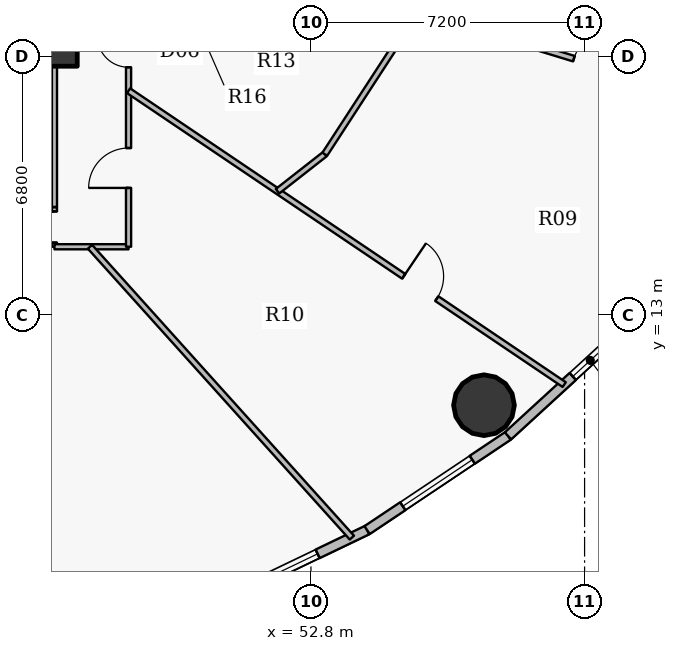
"""IFC4 building model, lengths in metres.
Left out: names, types, materials, properties, quantities, classifications, styles, units other than length and angle.
Written with IfcOpenShell. Run it as: python <this file> out.ifc"""

import sys

from ifc_helpers import new_model, si_unit, direction, frame, frame_2d, origin, origin_2d, place, context, subcontext, project, spatial, rectangle, hollow_circle, extrude, source, transform, mapped, element, fill, save


model = new_model("IFC4")
c1 = context("Model", 3, precision=1e-05, world=origin(), true_north=direction((0.0, 1.0)))
c2 = subcontext(c1, "Body", "Model", "MODEL_VIEW")
j1 = project(units=[si_unit("LENGTHUNIT", "METRE"), si_unit("PLANEANGLEUNIT", "RADIAN")], contexts=[c1])
p1 = place(None, origin())
s1 = spatial("IfcSite", under=j1, at=p1, CompositionType="ELEMENT")
p2 = place(p1, origin())
s2 = spatial("IfcBuilding", under=s1, at=p2, CompositionType="ELEMENT")
p3 = place(p2, frame((0.0, 0.0, 40.8)))
s3 = spatial("IfcBuildingStorey", under=s2, at=p3, CompositionType="ELEMENT", Elevation=40.8)
p4 = place(p3, frame((45.95, 20.25, 0.0), z_axis=(0.0, 0.0, 1.0), x_axis=(1.0, 0.0, 0.0)))
e1 = element("IfcColumn", 1, at=p4, inside=s3, PredefinedType="COLUMN", context=c2, shape_type="SweptSolid", body=[
    extrude(rectangle(XDim=1.4, YDim=1.4, at=origin_2d()), origin(), (0.0, 0.0, 1.0), 4.2),
])
p5 = place(p3, frame((57.353, 10.631, 0.0), z_axis=(0.0, 0.0, 1.0), x_axis=(1.0, 0.0, 0.0)))
e2 = element("IfcColumn", 2, at=p5, inside=s3, PredefinedType="COLUMN", context=c2, shape_type="SweptSolid", body=[
    extrude(hollow_circle(Radius=0.8, WallThickness=0.045, at=origin_2d()), origin(), (0.0, 0.0, 1.0), 4.2),
])
p6 = place(p3, frame((54.277, 7.344, 0.0), z_axis=(0.0, 0.0, 1.0), x_axis=(-0.901601503137, -0.432567601123, 0.0)))
e3 = element("IfcWall", 3, at=p6, inside=s3, PredefinedType="SOLIDWALL", context=c2, shape_type="SweptSolid", body=[
    extrude(rectangle(XDim=4.613, YDim=0.25, at=frame_2d((2.306, 0.0))), origin(), (0.0, 0.0, 1.0), 3.95),
])
p7 = place(p6, frame((1.445, 0.0, 0.9)))
e4 = element("IfcOpeningElement", 4, at=p7, cuts=e3, PredefinedType="OPENING", context=c2, shape_type="SweptSolid", body=[
    extrude(rectangle(XDim=2.2, YDim=2.0, at=origin_2d()), frame((1.1, 0.135, 1.0), z_axis=(0.0, -1.0, 0.0), x_axis=(1.0, 0.0, 0.0)), (0.0, 0.0, 1.0), 0.27),
])
p8 = place(p3, frame((57.985, 9.824, 0.0), z_axis=(0.0, 0.0, 1.0), x_axis=(-0.831240982525, -0.555912249343, 0.0)))
e5 = element("IfcWall", 5, at=p8, inside=s3, PredefinedType="SOLIDWALL", context=c2, shape_type="SweptSolid", body=[
    extrude(rectangle(XDim=4.46, YDim=0.25, at=frame_2d((2.23, 0.0))), origin(), (0.0, 0.0, 1.0), 3.95),
])
p9 = place(p8, frame((1.13, 0.0, 0.9)))
e6 = element("IfcOpeningElement", 6, at=p9, cuts=e5, PredefinedType="OPENING", context=c2, shape_type="SweptSolid", body=[
    extrude(rectangle(XDim=2.2, YDim=2.0, at=origin_2d()), frame((1.1, 0.135, 1.0), z_axis=(0.0, -1.0, 0.0), x_axis=(1.0, 0.0, 0.0)), (0.0, 0.0, 1.0), 0.27),
])
p10 = place(p3, frame((61.15, 12.725, 0.0), z_axis=(0.0, 0.0, 1.0), x_axis=(-0.737116376281, -0.67576582321, 0.0)))
e7 = element("IfcWall", 7, at=p10, inside=s3, PredefinedType="SOLIDWALL", context=c2, shape_type="SweptSolid", body=[
    extrude(rectangle(XDim=4.294, YDim=0.25, at=frame_2d((2.147, 0.0))), origin(), (0.0, 0.0, 1.0), 3.95),
])
p11 = place(p10, frame((0.731, 0.0, 0.9)))
e8 = element("IfcOpeningElement", 8, at=p11, cuts=e7, PredefinedType="OPENING", context=c2, shape_type="SweptSolid", body=[
    extrude(rectangle(XDim=1.25, YDim=1.65, at=origin_2d()), frame((0.625, 0.135, 0.825), z_axis=(0.0, -1.0, 0.0), x_axis=(1.0, 0.0, 0.0)), (0.0, 0.0, 1.0), 0.27),
])
p12 = place(p3, frame((46.05, 14.8, 0.0), z_axis=(0.0, 0.0, 1.0), x_axis=(0.0, 1.0, 0.0)))
e9 = element("IfcWall", 9, at=p12, inside=s3, PredefinedType="PARTITIONING", context=c2, shape_type="SweptSolid", body=[
    extrude(rectangle(XDim=1.038, YDim=0.135, at=frame_2d((0.519, 0.0))), origin(), (0.0, 0.0, 1.0), 3.95),
])
p13 = place(p12, frame((0.109, 0.0, 0.0)))
e10 = element("IfcOpeningElement", 10, at=p13, cuts=e9, PredefinedType="OPENING", context=c2, shape_type="SweptSolid", body=[
    extrude(rectangle(XDim=0.82, YDim=2.1, at=origin_2d()), frame((0.41, 0.078, 1.05), z_axis=(0.0, -1.0, 0.0), x_axis=(1.0, 0.0, 0.0)), (0.0, 0.0, 1.0), 0.155),
])
p14 = place(p3, frame((46.05, 14.8, 0.0), z_axis=(0.0, 0.0, 1.0), x_axis=(1.0, 0.0, 0.0)))
e11 = element("IfcWall", 11, at=p14, inside=s3, PredefinedType="PARTITIONING", context=c2, shape_type="SweptSolid", body=[
    extrude(rectangle(XDim=1.95, YDim=0.135, at=frame_2d((0.975, 0.0))), origin(), (0.0, 0.0, 1.0), 3.95),
])
p15 = place(p3, frame((46.985, 14.8, 0.0), z_axis=(0.0, 0.0, 1.0), x_axis=(0.669133664768, -0.743142071662, 0.0)))
e12 = element("IfcWall", 12, at=p15, inside=s3, PredefinedType="PARTITIONING", context=c2, shape_type="SweptSolid", body=[
    extrude(rectangle(XDim=10.299, YDim=0.15, at=frame_2d((5.149, 0.0))), origin(), (0.0, 0.0, 1.0), 3.335),
])
p16 = place(p3, frame((48.0, 14.8, 0.0), z_axis=(0.0, 0.0, 1.0), x_axis=(0.0, 1.0, 0.0)))
e13 = element("IfcWall", 13, at=p16, inside=s3, PredefinedType="PARTITIONING", context=c2, shape_type="SweptSolid", body=[
    extrude(rectangle(XDim=6.2, YDim=0.135, at=frame_2d((3.1, 0.0))), origin(), (0.0, 0.0, 1.0), 3.285),
])
p17 = place(p16, frame((1.548, 0.0, 0.0)))
e14 = element("IfcOpeningElement", 14, at=p17, cuts=e13, PredefinedType="OPENING", context=c2, shape_type="SweptSolid", body=[
    extrude(rectangle(XDim=1.05, YDim=2.15, at=origin_2d()), frame((0.525, 0.078, 1.075), z_axis=(0.0, -1.0, 0.0), x_axis=(1.0, 0.0, 0.0)), (0.0, 0.0, 1.0), 0.155),
])
p18 = place(p16, frame((4.723, 0.0, 0.0)))
e15 = element("IfcOpeningElement", 15, at=p18, cuts=e13, PredefinedType="OPENING", context=c2, shape_type="SweptSolid", body=[
    extrude(rectangle(XDim=0.82, YDim=2.1, at=origin_2d()), frame((0.41, 0.078, 1.05), z_axis=(0.0, -1.0, 0.0), x_axis=(1.0, 0.0, 0.0)), (0.0, 0.0, 1.0), 0.155),
])
p19 = place(p3, frame((48.0, 18.906, 0.0), z_axis=(0.0, 0.0, 1.0), x_axis=(0.829036724814, -0.559194160296, 0.0)))
e16 = element("IfcWall", 16, at=p19, inside=s3, PredefinedType="PARTITIONING", context=c2, shape_type="SweptSolid", body=[
    extrude(rectangle(XDim=13.828, YDim=0.15, at=frame_2d((6.914, 0.0))), origin(), (0.0, 0.0, 1.0), 3.335),
])
p20 = place(p19, frame((8.733, 0.0, 0.0)))
e17 = element("IfcOpeningElement", 17, at=p20, cuts=e16, PredefinedType="OPENING", context=c2, shape_type="SweptSolid", body=[
    extrude(rectangle(XDim=1.05, YDim=2.15, at=origin_2d()), frame((0.525, 0.085, 1.075), z_axis=(0.0, -1.0, 0.0), x_axis=(1.0, 0.0, 0.0)), (0.0, 0.0, 1.0), 0.17),
])
p21 = place(p3, frame((50.05, 22.705, 0.0), z_axis=(0.0, 0.0, 1.0), x_axis=(0.9563012706, -0.292383104588, 0.0)))
e18 = element("IfcWall", 18, at=p21, inside=s3, PredefinedType="PARTITIONING", context=c2, shape_type="SweptSolid", body=[
    extrude(rectangle(XDim=15.49, YDim=0.15, at=frame_2d((7.745, 0.0))), origin(), (0.0, 0.0, 1.0), 3.335),
])
p22 = place(p21, frame((10.11, 0.0, 0.0)))
e19 = element("IfcOpeningElement", 19, at=p22, cuts=e18, PredefinedType="OPENING", context=c2, shape_type="SweptSolid", body=[
    extrude(rectangle(XDim=1.05, YDim=2.15, at=origin_2d()), frame((0.525, 0.085, 1.075), z_axis=(0.0, -1.0, 0.0), x_axis=(1.0, 0.0, 0.0)), (0.0, 0.0, 1.0), 0.17),
])
p23 = place(p3, frame((51.92, 16.262, 0.0), z_axis=(0.0, 0.0, 1.0), x_axis=(0.787325584525, 0.616537447324, 0.0)))
e20 = element("IfcWall", 20, at=p23, inside=s3, PredefinedType="PARTITIONING", context=c2, shape_type="SweptSolid", body=[
    extrude(rectangle(XDim=1.58, YDim=0.15, at=frame_2d((0.79, 0.0))), origin(), (0.0, 0.0, 1.0), 3.95),
])
p24 = place(p3, frame((53.164, 17.236, 0.0), z_axis=(0.0, 0.0, 1.0), x_axis=(0.545448002944, 0.838144662981, 0.0)))
e21 = element("IfcWall", 21, at=p24, inside=s3, PredefinedType="PARTITIONING", context=c2, shape_type="SweptSolid", body=[
    extrude(rectangle(XDim=5.525, YDim=0.15, at=frame_2d((2.763, 0.0))), origin(), (0.0, 0.0, 1.0), 3.285),
])
p25 = place(p24, frame((4.631, 0.0, 0.0)))
e22 = element("IfcOpeningElement", 22, at=p25, cuts=e21, PredefinedType="OPENING", context=c2, shape_type="SweptSolid", body=[
    extrude(rectangle(XDim=0.76, YDim=2.1, at=origin_2d()), frame((0.38, 0.085, 1.05), z_axis=(0.0, -1.0, 0.0), x_axis=(1.0, 0.0, 0.0)), (0.0, 0.0, 1.0), 0.17),
])
p26 = place(p3, frame((46.05, 15.848, 0.0), z_axis=(0.0, 0.0, 1.0), x_axis=(0.0, 1.0, 0.0)))
e23 = element("IfcWall", 23, at=p26, inside=s3, PredefinedType="PARTITIONING", context=c2, shape_type="SweptSolid", body=[
    extrude(rectangle(XDim=3.952, YDim=0.135, at=frame_2d((1.976, 0.0))), origin(), (0.0, 0.0, 1.0), 3.285),
])
p27 = place(p3, frame((46.4, 19.8, 0.0), z_axis=(0.0, 0.0, 1.0), x_axis=(0.0, 1.0, 0.0)))
e24 = element("IfcWall", 24, at=p27, inside=s3, PredefinedType="PARTITIONING", context=c2, shape_type="SweptSolid", body=[
    extrude(rectangle(XDim=1.14, YDim=0.135, at=frame_2d((0.57, 0.0))), origin(), (0.0, 0.0, 1.0), 3.95),
])
m1 = source(origin(), c2, "Body", "SweptSolid", [
    extrude(rectangle(XDim=2.2, YDim=2.0, at=origin_2d()), frame((1.1, 0.03, 1.0), z_axis=(0.0, -1.0, 0.0), x_axis=(1.0, 0.0, 0.0)), (0.0, 0.0, 1.0), 0.06),
])
p28 = place(p7, origin())
e25 = element("IfcWindow", 25, at=p28, inside=s3, PartitioningType="TRIPLE_PANEL_VERTICAL", PredefinedType="WINDOW", context=c2, shape_type="MappedRepresentation", body=[
    mapped(m1, transform((0.0, 0.0, 0.0), x_axis=(1.0, 0.0, 0.0), y_axis=(0.0, 1.0, 0.0), z_axis=(0.0, 0.0, 1.0), scale=1.0)),
])
fill(e4, e25)
p29 = place(p9, origin())
e26 = element("IfcWindow", 26, at=p29, inside=s3, PartitioningType="TRIPLE_PANEL_VERTICAL", PredefinedType="WINDOW", context=c2, shape_type="MappedRepresentation", body=[
    mapped(m1, transform((0.0, 0.0, 0.0), x_axis=(1.0, 0.0, 0.0), y_axis=(0.0, 1.0, 0.0), z_axis=(0.0, 0.0, 1.0), scale=1.0)),
])
fill(e6, e26)
m2 = source(origin(), c2, "Body", "SweptSolid", [
    extrude(rectangle(XDim=1.25, YDim=1.65, at=origin_2d()), frame((0.625, 0.03, 0.825), z_axis=(0.0, -1.0, 0.0), x_axis=(1.0, 0.0, 0.0)), (0.0, 0.0, 1.0), 0.06),
])
p30 = place(p11, origin())
e27 = element("IfcWindow", 27, at=p30, inside=s3, PartitioningType="SINGLE_PANEL", PredefinedType="WINDOW", context=c2, shape_type="MappedRepresentation", body=[
    mapped(m2, transform((0.0, 0.0, 0.0), x_axis=(1.0, 0.0, 0.0), y_axis=(0.0, 1.0, 0.0), z_axis=(0.0, 0.0, 1.0), scale=1.0)),
])
fill(e8, e27)
m3 = source(origin(), c2, "Body", "SweptSolid", [
    extrude(rectangle(XDim=0.82, YDim=2.1, at=origin_2d()), frame((0.41, 0.025, 1.05), z_axis=(0.0, -1.0, 0.0), x_axis=(1.0, 0.0, 0.0)), (0.0, 0.0, 1.0), 0.05),
])
p31 = place(p13, origin())
e28 = element("IfcDoor", 28, at=p31, inside=s3, OperationType="SINGLE_SWING_RIGHT", PredefinedType="DOOR", context=c2, shape_type="MappedRepresentation", body=[
    mapped(m3, transform((0.0, 0.0, 0.0), x_axis=(1.0, 0.0, 0.0), y_axis=(0.0, 1.0, 0.0), z_axis=(0.0, 0.0, 1.0), scale=1.0)),
])
fill(e10, e28)
m4 = source(origin(), c2, "Body", "SweptSolid", [
    extrude(rectangle(XDim=1.05, YDim=2.15, at=origin_2d()), frame((0.525, 0.025, 1.075), z_axis=(0.0, -1.0, 0.0), x_axis=(1.0, 0.0, 0.0)), (0.0, 0.0, 1.0), 0.05),
])
p32 = place(p17, origin())
e29 = element("IfcDoor", 29, at=p32, inside=s3, OperationType="SINGLE_SWING_LEFT", PredefinedType="DOOR", context=c2, shape_type="MappedRepresentation", body=[
    mapped(m4, transform((0.0, 0.0, 0.0), x_axis=(1.0, 0.0, 0.0), y_axis=(0.0, 1.0, 0.0), z_axis=(0.0, 0.0, 1.0), scale=1.0)),
])
fill(e14, e29)
p33 = place(p18, origin())
e30 = element("IfcDoor", 30, at=p33, inside=s3, OperationType="SINGLE_SWING_RIGHT", PredefinedType="DOOR", context=c2, shape_type="MappedRepresentation", body=[
    mapped(m3, transform((0.0, 0.0, 0.0), x_axis=(1.0, 0.0, 0.0), y_axis=(0.0, 1.0, 0.0), z_axis=(0.0, 0.0, 1.0), scale=1.0)),
])
fill(e15, e30)
p34 = place(p20, origin())
e31 = element("IfcDoor", 31, at=p34, inside=s3, OperationType="SINGLE_SWING_LEFT", PredefinedType="DOOR", context=c2, shape_type="MappedRepresentation", body=[
    mapped(m4, transform((0.0, 0.0, 0.0), x_axis=(1.0, 0.0, 0.0), y_axis=(0.0, 1.0, 0.0), z_axis=(0.0, 0.0, 1.0), scale=1.0)),
])
fill(e17, e31)
p35 = place(p22, origin())
e32 = element("IfcDoor", 32, at=p35, inside=s3, OperationType="SINGLE_SWING_RIGHT", PredefinedType="DOOR", context=c2, shape_type="MappedRepresentation", body=[
    mapped(m4, transform((0.0, 0.0, 0.0), x_axis=(1.0, 0.0, 0.0), y_axis=(0.0, 1.0, 0.0), z_axis=(0.0, 0.0, 1.0), scale=1.0)),
])
fill(e19, e32)
save(model, sys.argv[1])
